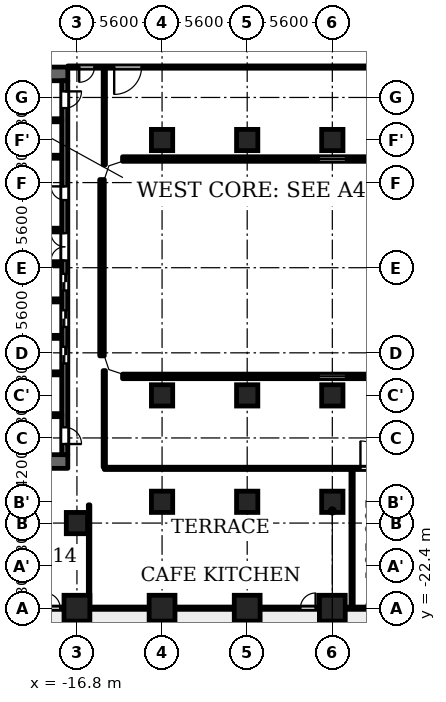
"""IFC4 building model, lengths in metres.
Left out: names, types, materials, properties, quantities, classifications, styles, units other than length and angle.
Written with IfcOpenShell. Run it as: python <this file> out.ifc"""

import sys

from ifc_helpers import new_model, si_unit, direction, frame, frame_2d, origin, origin_2d, place, context, subcontext, project, spatial, polyline, rectangle, outline, extrude, element, fill, save


model = new_model("IFC4")
c1 = context("Model", 3, precision=1e-05, world=origin(), true_north=direction((0.0, 1.0)))
c2 = subcontext(c1, "Body", "Model", "MODEL_VIEW")
j1 = project(units=[si_unit("LENGTHUNIT", "METRE"), si_unit("PLANEANGLEUNIT", "RADIAN")], contexts=[c1])
p1 = place(None, origin())
s1 = spatial("IfcSite", under=j1, at=p1, CompositionType="ELEMENT")
p2 = place(p1, origin())
s2 = spatial("IfcBuilding", under=s1, at=p2, CompositionType="ELEMENT")
p3 = place(p2, frame((0.0, 0.0, 25.7)))
s3 = spatial("IfcBuildingStorey", under=s2, at=p3, CompositionType="ELEMENT", Elevation=25.7)
for number, where, z_axis, x_axis in (
    (1, (-16.8, -22.4, 0.0), (0.0, 0.0, 1.0), (1.0, 0.0, 0.0)),
    (2, (-11.2, -22.4, 0.0), (0.0, 0.0, 1.0), (1.0, 0.0, 0.0)),
    (3, (-5.6, -22.4, 0.0), (0.0, 0.0, 1.0), (1.0, 0.0, 0.0)),
    (4, (0.0, -22.4, 0.0), (0.0, 0.0, 1.0), (1.0, 0.0, 0.0)),
):
    element("IfcColumn", number, at=place(p3, frame(where, z_axis=z_axis, x_axis=x_axis)), inside=s3, PredefinedType="COLUMN", context=c2, shape_type="SweptSolid", body=[
        extrude(rectangle(XDim=1.7, YDim=1.7, at=origin_2d()), origin(), (0.0, 0.0, 1.0), 4.8),
    ])
for number, where, z_axis, x_axis in (
    (5, (-16.8, -16.8, 0.0), (0.0, 0.0, 1.0), (1.0, 0.0, 0.0)),
    (6, (-11.2, -8.4, 0.0), (0.0, 0.0, 1.0), (1.0, 0.0, 0.0)),
    (7, (-11.2, 8.4, 0.0), (0.0, 0.0, 1.0), (1.0, 0.0, 0.0)),
    (8, (-5.6, -8.4, 0.0), (0.0, 0.0, 1.0), (1.0, 0.0, 0.0)),
    (9, (-5.6, 8.4, 0.0), (0.0, 0.0, 1.0), (1.0, 0.0, 0.0)),
    (10, (0.0, -8.4, 0.0), (0.0, 0.0, 1.0), (1.0, 0.0, 0.0)),
    (11, (0.0, 8.4, 0.0), (0.0, 0.0, 1.0), (1.0, 0.0, 0.0)),
    (12, (-11.2, -15.4, 0.0), (0.0, 0.0, 1.0), (1.0, 0.0, 0.0)),
    (13, (-5.6, -15.4, 0.0), (0.0, 0.0, 1.0), (1.0, 0.0, 0.0)),
    (14, (0.0, -15.4, 0.0), (0.0, 0.0, 1.0), (1.0, 0.0, 0.0)),
):
    element("IfcColumn", number, at=place(p3, frame(where, z_axis=z_axis, x_axis=x_axis)), inside=s3, PredefinedType="COLUMN", context=c2, shape_type="SweptSolid", body=[
        extrude(rectangle(XDim=1.4, YDim=1.4, at=origin_2d()), origin(), (0.0, 0.0, 1.0), 4.8),
    ])
p4 = place(p3, frame((-15.15, -5.8, 0.0), z_axis=(0.0, 0.0, 1.0), x_axis=(0.0, 1.0, 0.0)))
e15 = element("IfcWall", 15, at=p4, inside=s3, PredefinedType="SOLIDWALL", context=c2, shape_type="SweptSolid", body=[
    extrude(rectangle(XDim=11.6, YDim=0.3, at=frame_2d((5.8, 0.0))), origin(), (0.0, 0.0, 1.0), 4.45),
])
p5 = place(p3, frame((-13.8, 7.15, 0.0), z_axis=(0.0, 0.0, 1.0), x_axis=(1.0, 0.0, 0.0)))
e16 = element("IfcWall", 16, at=p5, inside=s3, PredefinedType="SOLIDWALL", context=c2, shape_type="SweptSolid", body=[
    extrude(rectangle(XDim=27.6, YDim=0.3, at=frame_2d((13.8, 0.0))), origin(), (0.0, 0.0, 1.0), 4.45),
])
p6 = place(p5, frame((12.9, 0.0, 0.9)))
e17 = element("IfcOpeningElement", 17, at=p6, cuts=e16, PredefinedType="OPENING", context=c2, shape_type="SweptSolid", body=[
    extrude(rectangle(XDim=1.8, YDim=1.25, at=frame_2d((0.9, 0.625))), frame((0.0, 0.16, 0.0), z_axis=(0.0, -1.0, 0.0), x_axis=(1.0, 0.0, 0.0)), (0.0, 0.0, 1.0), 0.32),
])
p7 = place(p3, frame((13.8, -7.15, 0.0), z_axis=(0.0, 0.0, 1.0), x_axis=(-1.0, 0.0, 0.0)))
e18 = element("IfcWall", 18, at=p7, inside=s3, PredefinedType="SOLIDWALL", context=c2, shape_type="SweptSolid", body=[
    extrude(rectangle(XDim=27.6, YDim=0.3, at=frame_2d((13.8, 0.0))), origin(), (0.0, 0.0, 1.0), 4.45),
])
p8 = place(p7, frame((12.9, 0.0, 0.9)))
e19 = element("IfcOpeningElement", 19, at=p8, cuts=e18, PredefinedType="OPENING", context=c2, shape_type="SweptSolid", body=[
    extrude(rectangle(XDim=1.8, YDim=1.25, at=frame_2d((0.9, 0.625))), frame((0.0, 0.16, 0.0), z_axis=(0.0, -1.0, 0.0), x_axis=(1.0, 0.0, 0.0)), (0.0, 0.0, 1.0), 0.32),
])
for number, where, z_axis, x_axis in (
    (20, (-17.4, 12.75, 0.0), (0.0, 0.0, 1.0), (-1.0, 0.0, 0.0)),
    (21, (-17.4, -12.75, 0.0), (0.0, 0.0, 1.0), (-1.0, 0.0, 0.0)),
):
    element("IfcWall", number, at=place(p3, frame(where, z_axis=z_axis, x_axis=x_axis)), inside=s3, PredefinedType="SHEAR", context=c2, shape_type="SweptSolid", body=[
        extrude(rectangle(XDim=10.4, YDim=0.9, at=frame_2d((5.2, 0.0))), origin(), (0.0, 0.0, 1.0), 4.45),
    ])
p9 = place(p3, frame((-17.6, -12.3, 0.0), z_axis=(0.0, 0.0, 1.0), x_axis=(0.0, 1.0, 0.0)))
e22 = element("IfcWall", 22, at=p9, inside=s3, PredefinedType="SHEAR", context=c2, shape_type="SweptSolid", body=[
    extrude(rectangle(XDim=24.6, YDim=0.4, at=frame_2d((12.3, 0.0))), origin(), (0.0, 0.0, 1.0), 4.45),
])
p10 = place(p9, frame((6.0, 0.0, 0.0)))
e23 = element("IfcOpeningElement", 23, at=p10, cuts=e22, PredefinedType="OPENING", context=c2, shape_type="SweptSolid", body=[
    extrude(rectangle(XDim=1.1, YDim=2.1, at=frame_2d((0.55, 1.05))), frame((0.0, 0.21, 0.0), z_axis=(0.0, -1.0, 0.0), x_axis=(1.0, 0.0, 0.0)), (0.0, 0.0, 1.0), 0.42),
])
p11 = place(p9, frame((8.4, 0.0, 0.0)))
e24 = element("IfcOpeningElement", 24, at=p11, cuts=e22, PredefinedType="OPENING", context=c2, shape_type="SweptSolid", body=[
    extrude(rectangle(XDim=1.1, YDim=2.1, at=frame_2d((0.55, 1.05))), frame((0.0, 0.21, 0.0), z_axis=(0.0, -1.0, 0.0), x_axis=(1.0, 0.0, 0.0)), (0.0, 0.0, 1.0), 0.42),
])
p12 = place(p9, frame((10.8, 0.0, 0.0)))
e25 = element("IfcOpeningElement", 25, at=p12, cuts=e22, PredefinedType="OPENING", context=c2, shape_type="SweptSolid", body=[
    extrude(rectangle(XDim=1.1, YDim=2.1, at=frame_2d((0.55, 1.05))), frame((0.0, 0.21, 0.0), z_axis=(0.0, -1.0, 0.0), x_axis=(1.0, 0.0, 0.0)), (0.0, 0.0, 1.0), 0.42),
])
p13 = place(p9, frame((16.75, 0.0, 0.0)))
e26 = element("IfcOpeningElement", 26, at=p13, cuts=e22, PredefinedType="OPENING", context=c2, shape_type="SweptSolid", body=[
    extrude(rectangle(XDim=0.9, YDim=2.1, at=frame_2d((0.45, 1.05))), frame((0.0, 0.21, 0.0), z_axis=(0.0, -1.0, 0.0), x_axis=(1.0, 0.0, 0.0)), (0.0, 0.0, 1.0), 0.42),
])
p14 = place(p9, frame((22.8, 0.0, 0.0)))
e27 = element("IfcOpeningElement", 27, at=p14, cuts=e22, PredefinedType="OPENING", context=c2, shape_type="SweptSolid", body=[
    extrude(rectangle(XDim=1.1, YDim=2.1, at=frame_2d((0.55, 1.05))), frame((0.0, 0.21, 0.0), z_axis=(0.0, -1.0, 0.0), x_axis=(1.0, 0.0, 0.0)), (0.0, 0.0, 1.0), 0.42),
])
p15 = place(p9, frame((0.7, 0.0, 0.0)))
e28 = element("IfcOpeningElement", 28, at=p15, cuts=e22, PredefinedType="OPENING", context=c2, shape_type="SweptSolid", body=[
    extrude(rectangle(XDim=1.1, YDim=2.1, at=frame_2d((0.55, 1.05))), frame((0.0, 0.21, 0.0), z_axis=(0.0, -1.0, 0.0), x_axis=(1.0, 0.0, 0.0)), (0.0, 0.0, 1.0), 0.42),
])
p16 = place(p9, frame((12.775, 0.0, 0.0)))
e29 = element("IfcOpeningElement", 29, at=p16, cuts=e22, PredefinedType="OPENING", context=c2, shape_type="SweptSolid", body=[
    extrude(rectangle(XDim=1.8, YDim=2.1, at=frame_2d((0.9, 1.05))), frame((0.0, 0.21, 0.0), z_axis=(0.0, -1.0, 0.0), x_axis=(1.0, 0.0, 0.0)), (0.0, 0.0, 1.0), 0.42),
])
p17 = place(p3, frame((-17.8, -9.7, 0.0), z_axis=(0.0, 0.0, 1.0), x_axis=(-1.0, 0.0, 0.0)))
e30 = element("IfcWall", 30, at=p17, inside=s3, PredefinedType="SHEAR", context=c2, shape_type="SweptSolid", body=[
    extrude(rectangle(XDim=8.3, YDim=0.2, at=frame_2d((4.15, 0.0))), origin(), (0.0, 0.0, 1.0), 4.45),
])
p18 = place(p17, frame((0.85, 0.0, 0.0)))
e31 = element("IfcOpeningElement", 31, at=p18, cuts=e30, PredefinedType="OPENING", context=c2, shape_type="SweptSolid", body=[
    extrude(rectangle(XDim=1.1, YDim=2.1, at=frame_2d((0.55, 1.05))), frame((0.0, 0.11, 0.0), z_axis=(0.0, -1.0, 0.0), x_axis=(1.0, 0.0, 0.0)), (0.0, 0.0, 1.0), 0.22),
])
p19 = place(p17, frame((3.75, 0.0, 0.0)))
e32 = element("IfcOpeningElement", 32, at=p19, cuts=e30, PredefinedType="OPENING", context=c2, shape_type="SweptSolid", body=[
    extrude(rectangle(XDim=1.1, YDim=2.1, at=frame_2d((0.55, 1.05))), frame((0.0, 0.11, 0.0), z_axis=(0.0, -1.0, 0.0), x_axis=(1.0, 0.0, 0.0)), (0.0, 0.0, 1.0), 0.22),
])
for number, where, z_axis, x_axis in (
    (33, (-17.8, -6.95, 0.0), (0.0, 0.0, 1.0), (-1.0, 0.0, 0.0)),
    (34, (-17.8, -4.55, 0.0), (0.0, 0.0, 1.0), (-1.0, 0.0, 0.0)),
    (35, (-17.8, -2.15, 0.0), (0.0, 0.0, 1.0), (-1.0, 0.0, 0.0)),
):
    element("IfcWall", number, at=place(p3, frame(where, z_axis=z_axis, x_axis=x_axis)), inside=s3, PredefinedType="PARTITIONING", context=c2, shape_type="SweptSolid", body=[
        extrude(rectangle(XDim=2.8, YDim=0.2, at=frame_2d((1.4, 0.0))), origin(), (0.0, 0.0, 1.0), 4.45),
    ])
for number, where, z_axis, x_axis in (
    (36, (-17.8, 0.25, 0.0), (0.0, 0.0, 1.0), (-1.0, 0.0, 0.0)),
    (37, (-17.8, 2.5, 0.0), (0.0, 0.0, 1.0), (-1.0, 0.0, 0.0)),
):
    element("IfcWall", number, at=place(p3, frame(where, z_axis=z_axis, x_axis=x_axis)), inside=s3, PredefinedType="PARTITIONING", context=c2, shape_type="SweptSolid", body=[
        extrude(rectangle(XDim=3.0, YDim=0.2, at=frame_2d((1.5, 0.0))), origin(), (0.0, 0.0, 1.0), 4.45),
    ])
p20 = place(p3, frame((-17.8, 7.3, 0.0), z_axis=(0.0, 0.0, 1.0), x_axis=(-1.0, 0.0, 0.0)))
e38 = element("IfcWall", 38, at=p20, inside=s3, PredefinedType="PARTITIONING", context=c2, shape_type="SweptSolid", body=[
    extrude(rectangle(XDim=2.8, YDim=0.2, at=frame_2d((1.4, 0.0))), origin(), (0.0, 0.0, 1.0), 4.45),
])
p21 = place(p3, frame((-17.8, 9.7, 0.0), z_axis=(0.0, 0.0, 1.0), x_axis=(-1.0, 0.0, 0.0)))
e39 = element("IfcWall", 39, at=p21, inside=s3, PredefinedType="SHEAR", context=c2, shape_type="SweptSolid", body=[
    extrude(rectangle(XDim=8.3, YDim=0.2, at=frame_2d((4.15, 0.0))), origin(), (0.0, 0.0, 1.0), 4.45),
])
p22 = place(p21, frame((0.85, 0.0, 0.0)))
e40 = element("IfcOpeningElement", 40, at=p22, cuts=e39, PredefinedType="OPENING", context=c2, shape_type="SweptSolid", body=[
    extrude(rectangle(XDim=1.1, YDim=2.1, at=frame_2d((0.55, 1.05))), frame((0.0, 0.11, 0.0), z_axis=(0.0, -1.0, 0.0), x_axis=(1.0, 0.0, 0.0)), (0.0, 0.0, 1.0), 0.22),
])
p23 = place(p21, frame((3.75, 0.0, 0.0)))
e41 = element("IfcOpeningElement", 41, at=p23, cuts=e39, PredefinedType="OPENING", context=c2, shape_type="SweptSolid", body=[
    extrude(rectangle(XDim=1.1, YDim=2.1, at=frame_2d((0.55, 1.05))), frame((0.0, 0.11, 0.0), z_axis=(0.0, -1.0, 0.0), x_axis=(1.0, 0.0, 0.0)), (0.0, 0.0, 1.0), 0.22),
])
p24 = place(p3, frame((-18.98, -22.4, 0.0), z_axis=(0.0, 0.0, 1.0), x_axis=(1.0, 0.0, 0.0)))
e42 = element("IfcWall", 42, at=p24, inside=s3, PredefinedType="PARTITIONING", context=c2, shape_type="SweptSolid", body=[
    extrude(rectangle(XDim=38.211, YDim=0.15, at=frame_2d((19.105, 0.0))), origin(), (0.0, 0.0, 1.0), 3.55),
])
p25 = place(p24, frame((21.18, 0.0, 0.0)))
e43 = element("IfcOpeningElement", 43, at=p25, cuts=e42, PredefinedType="OPENING", context=c2, shape_type="SweptSolid", body=[
    extrude(rectangle(XDim=1.2, YDim=2.1, at=frame_2d((0.6, 1.05))), frame((0.0, 0.085, 0.0), z_axis=(0.0, -1.0, 0.0), x_axis=(1.0, 0.0, 0.0)), (0.0, 0.0, 1.0), 0.17),
])
p26 = place(p24, frame((0.08, 0.0, 0.0)))
e44 = element("IfcOpeningElement", 44, at=p26, cuts=e42, PredefinedType="OPENING", context=c2, shape_type="SweptSolid", body=[
    extrude(rectangle(XDim=1.0, YDim=2.1, at=frame_2d((0.5, 1.05))), frame((0.0, 0.085, 0.0), z_axis=(0.0, -1.0, 0.0), x_axis=(1.0, 0.0, 0.0)), (0.0, 0.0, 1.0), 0.17),
])
p27 = place(p24, frame((16.88, 0.0, 0.0)))
e45 = element("IfcOpeningElement", 45, at=p27, cuts=e42, PredefinedType="OPENING", context=c2, shape_type="SweptSolid", body=[
    extrude(rectangle(XDim=1.0, YDim=2.1, at=frame_2d((0.5, 1.05))), frame((0.0, 0.085, 0.0), z_axis=(0.0, -1.0, 0.0), x_axis=(1.0, 0.0, 0.0)), (0.0, 0.0, 1.0), 0.17),
])
p28 = place(p24, frame((25.68, 0.0, 0.0)))
e46 = element("IfcOpeningElement", 46, at=p28, cuts=e42, PredefinedType="OPENING", context=c2, shape_type="SweptSolid", body=[
    extrude(rectangle(XDim=0.9, YDim=2.1, at=frame_2d((0.45, 1.05))), frame((0.0, 0.085, 0.0), z_axis=(0.0, -1.0, 0.0), x_axis=(1.0, 0.0, 0.0)), (0.0, 0.0, 1.0), 0.17),
])
p29 = place(p24, frame((31.18, 0.0, 0.0)))
e47 = element("IfcOpeningElement", 47, at=p29, cuts=e42, PredefinedType="OPENING", context=c2, shape_type="SweptSolid", body=[
    extrude(rectangle(XDim=0.9, YDim=2.1, at=frame_2d((0.45, 1.05))), frame((0.0, 0.085, 0.0), z_axis=(0.0, -1.0, 0.0), x_axis=(1.0, 0.0, 0.0)), (0.0, 0.0, 1.0), 0.17),
])
p30 = place(p24, frame((33.13, 0.0, 0.0)))
e48 = element("IfcOpeningElement", 48, at=p30, cuts=e42, PredefinedType="OPENING", context=c2, shape_type="SweptSolid", body=[
    extrude(rectangle(XDim=0.9, YDim=2.1, at=frame_2d((0.45, 1.05))), frame((0.0, 0.085, 0.0), z_axis=(0.0, -1.0, 0.0), x_axis=(1.0, 0.0, 0.0)), (0.0, 0.0, 1.0), 0.17),
])
p31 = place(p24, frame((37.231, 0.0, 0.0)))
e49 = element("IfcOpeningElement", 49, at=p31, cuts=e42, PredefinedType="OPENING", context=c2, shape_type="SweptSolid", body=[
    extrude(rectangle(XDim=0.9, YDim=2.1, at=frame_2d((0.45, 1.05))), frame((0.0, 0.085, 0.0), z_axis=(0.0, -1.0, 0.0), x_axis=(1.0, 0.0, 0.0)), (0.0, 0.0, 1.0), 0.17),
])
p32 = place(p3, frame((-15.005, -13.2, 0.0), z_axis=(0.0, 0.0, 1.0), x_axis=(1.0, 0.0, 0.0)))
e50 = element("IfcWall", 50, at=p32, inside=s3, PredefinedType="PARTITIONING", context=c2, shape_type="SweptSolid", body=[
    extrude(rectangle(XDim=30.01, YDim=0.15, at=frame_2d((15.005, 0.0))), origin(), (0.0, 0.0, 1.0), 4.45),
])
p33 = place(p32, frame((16.855, 0.0, 0.0)))
e51 = element("IfcOpeningElement", 51, at=p33, cuts=e50, PredefinedType="OPENING", context=c2, shape_type="SweptSolid", body=[
    extrude(rectangle(XDim=1.8, YDim=2.1, at=frame_2d((0.9, 1.05))), frame((0.0, 0.085, 0.0), z_axis=(0.0, -1.0, 0.0), x_axis=(1.0, 0.0, 0.0)), (0.0, 0.0, 1.0), 0.17),
])
p34 = place(p3, frame((-17.4, 13.2, 0.0), z_axis=(0.0, 0.0, 1.0), x_axis=(1.0, 0.0, 0.0)))
e52 = element("IfcWall", 52, at=p34, inside=s3, PredefinedType="PARTITIONING", context=c2, shape_type="SweptSolid", body=[
    extrude(rectangle(XDim=34.8, YDim=0.15, at=frame_2d((17.4, 0.0))), origin(), (0.0, 0.0, 1.0), 4.45),
])
p35 = place(p34, frame((3.05, 0.0, 0.0)))
e53 = element("IfcOpeningElement", 53, at=p35, cuts=e52, PredefinedType="OPENING", context=c2, shape_type="SweptSolid", body=[
    extrude(rectangle(XDim=1.8, YDim=2.1, at=frame_2d((0.9, 1.05))), frame((0.0, 0.085, 0.0), z_axis=(0.0, -1.0, 0.0), x_axis=(1.0, 0.0, 0.0)), (0.0, 0.0, 1.0), 0.17),
])
p36 = place(p34, frame((0.75, 0.0, 0.0)))
e54 = element("IfcOpeningElement", 54, at=p36, cuts=e52, PredefinedType="OPENING", context=c2, shape_type="SweptSolid", body=[
    extrude(rectangle(XDim=1.0, YDim=2.1, at=frame_2d((0.5, 1.05))), frame((0.0, 0.085, 0.0), z_axis=(0.0, -1.0, 0.0), x_axis=(1.0, 0.0, 0.0)), (0.0, 0.0, 1.0), 0.17),
])
p37 = place(p34, frame((33.15, 0.0, 0.0)))
e55 = element("IfcOpeningElement", 55, at=p37, cuts=e52, PredefinedType="OPENING", context=c2, shape_type="SweptSolid", body=[
    extrude(rectangle(XDim=1.0, YDim=2.1, at=frame_2d((0.5, 1.05))), frame((0.0, 0.085, 0.0), z_axis=(0.0, -1.0, 0.0), x_axis=(1.0, 0.0, 0.0)), (0.0, 0.0, 1.0), 0.17),
])
p38 = place(p3, frame((-16.0, -22.325, 0.0), z_axis=(0.0, 0.0, 1.0), x_axis=(0.0, 1.0, 0.0)))
e56 = element("IfcWall", 56, at=p38, inside=s3, PredefinedType="PARTITIONING", context=c2, shape_type="SweptSolid", body=[
    extrude(rectangle(XDim=6.725, YDim=0.1, at=frame_2d((3.362, 0.0))), origin(), (0.0, 0.0, 1.0), 4.45),
])
for number, where, z_axis, x_axis in (
    (57, (-15.0, -13.125, 0.0), (0.0, 0.0, 1.0), (0.0, 1.0, 0.0)),
    (58, (-15.0, 6.769, 0.0), (0.0, 0.0, 1.0), (0.0, 1.0, 0.0)),
):
    element("IfcWall", number, at=place(p3, frame(where, z_axis=z_axis, x_axis=x_axis)), inside=s3, PredefinedType="PARTITIONING", context=c2, shape_type="SweptSolid", body=[
        extrude(rectangle(XDim=6.356, YDim=0.15, at=frame_2d((3.178, 0.0))), origin(), (0.0, 0.0, 1.0), 4.45),
    ])
p39 = place(p3, frame((1.3, -22.325, 0.0), z_axis=(0.0, 0.0, 1.0), x_axis=(0.0, 1.0, 0.0)))
e59 = element("IfcWall", 59, at=p39, inside=s3, PredefinedType="PARTITIONING", context=c2, shape_type="SweptSolid", body=[
    extrude(rectangle(XDim=9.05, YDim=0.15, at=frame_2d((4.525, 0.0))), origin(), (0.0, 0.0, 1.0), 4.45),
])
p40 = place(p3, origin())
e60 = element("IfcWall", 60, at=p40, inside=s3, PredefinedType="SOLIDWALL", context=c2, shape_type="SweptSolid", body=[
    extrude(outline(polyline([(-13.849, 7.3), (-14.937, 6.937), (-15.3, 5.849), (-15.3, 5.8), (-15.0, 5.8), (-14.7, 6.7), (-13.8, 7.0), (-13.8, 7.3), (-13.849, 7.3)])), origin(), (0.0, 0.0, 1.0), 4.45),
])
e61 = element("IfcWall", 61, at=p40, inside=s3, PredefinedType="SOLIDWALL", context=c2, shape_type="SweptSolid", body=[
    extrude(outline(polyline([(-14.937, -6.937), (-13.849, -7.3), (-13.8, -7.3), (-13.8, -7.0), (-14.7, -6.7), (-15.0, -5.8), (-15.3, -5.8), (-15.3, -5.849), (-14.937, -6.937)])), origin(), (0.0, 0.0, 1.0), 4.45),
])
p41 = place(p10, origin())
e62 = element("IfcDoor", 62, at=p41, inside=s3, OperationType="DOUBLE_DOOR_SLIDING", PredefinedType="DOOR", context=c2, shape_type="SweptSolid", body=[
    extrude(rectangle(XDim=1.1, YDim=2.1, at=frame_2d((0.55, 1.05))), frame((0.0, 0.025, 0.0), z_axis=(0.0, -1.0, 0.0), x_axis=(1.0, 0.0, 0.0)), (0.0, 0.0, 1.0), 0.05),
])
fill(e23, e62)
p42 = place(p11, origin())
e63 = element("IfcDoor", 63, at=p42, inside=s3, OperationType="DOUBLE_DOOR_SLIDING", PredefinedType="DOOR", context=c2, shape_type="SweptSolid", body=[
    extrude(rectangle(XDim=1.1, YDim=2.1, at=frame_2d((0.55, 1.05))), frame((0.0, 0.025, 0.0), z_axis=(0.0, -1.0, 0.0), x_axis=(1.0, 0.0, 0.0)), (0.0, 0.0, 1.0), 0.05),
])
fill(e24, e63)
p43 = place(p12, origin())
e64 = element("IfcDoor", 64, at=p43, inside=s3, OperationType="DOUBLE_DOOR_SLIDING", PredefinedType="DOOR", context=c2, shape_type="SweptSolid", body=[
    extrude(rectangle(XDim=1.1, YDim=2.1, at=frame_2d((0.55, 1.05))), frame((0.0, 0.025, 0.0), z_axis=(0.0, -1.0, 0.0), x_axis=(1.0, 0.0, 0.0)), (0.0, 0.0, 1.0), 0.05),
])
fill(e25, e64)
p44 = place(p13, origin())
e65 = element("IfcDoor", 65, at=p44, inside=s3, OperationType="SINGLE_SWING_LEFT", PredefinedType="DOOR", context=c2, shape_type="SweptSolid", body=[
    extrude(rectangle(XDim=0.9, YDim=2.1, at=frame_2d((0.45, 1.05))), frame((0.0, 0.025, 0.0), z_axis=(0.0, -1.0, 0.0), x_axis=(1.0, 0.0, 0.0)), (0.0, 0.0, 1.0), 0.05),
])
fill(e26, e65)
p45 = place(p14, origin())
e66 = element("IfcDoor", 66, at=p45, inside=s3, OperationType="SINGLE_SWING_RIGHT", PredefinedType="DOOR", context=c2, shape_type="SweptSolid", body=[
    extrude(rectangle(XDim=1.1, YDim=2.1, at=frame_2d((0.55, 1.05))), frame((0.0, 0.025, 0.0), z_axis=(0.0, -1.0, 0.0), x_axis=(1.0, 0.0, 0.0)), (0.0, 0.0, 1.0), 0.05),
])
fill(e27, e66)
p46 = place(p15, origin())
e67 = element("IfcDoor", 67, at=p46, inside=s3, OperationType="SINGLE_SWING_LEFT", PredefinedType="DOOR", context=c2, shape_type="SweptSolid", body=[
    extrude(rectangle(XDim=1.1, YDim=2.1, at=frame_2d((0.55, 1.05))), frame((0.0, 0.025, 0.0), z_axis=(0.0, -1.0, 0.0), x_axis=(1.0, 0.0, 0.0)), (0.0, 0.0, 1.0), 0.05),
])
fill(e28, e67)
p47 = place(p16, origin())
e68 = element("IfcDoor", 68, at=p47, inside=s3, OperationType="DOUBLE_DOOR_SINGLE_SWING", PredefinedType="DOOR", context=c2, shape_type="SweptSolid", body=[
    extrude(rectangle(XDim=1.8, YDim=2.1, at=frame_2d((0.9, 1.05))), frame((0.0, 0.025, 0.0), z_axis=(0.0, -1.0, 0.0), x_axis=(1.0, 0.0, 0.0)), (0.0, 0.0, 1.0), 0.05),
])
fill(e29, e68)
p48 = place(p35, origin())
e69 = element("IfcDoor", 69, at=p48, inside=s3, OperationType="SINGLE_SWING_LEFT", PredefinedType="DOOR", context=c2, shape_type="SweptSolid", body=[
    extrude(rectangle(XDim=1.8, YDim=2.1, at=frame_2d((0.9, 1.05))), frame((0.0, 0.025, 0.0), z_axis=(0.0, -1.0, 0.0), x_axis=(1.0, 0.0, 0.0)), (0.0, 0.0, 1.0), 0.05),
])
fill(e53, e69)
p49 = place(p36, origin())
e70 = element("IfcDoor", 70, at=p49, inside=s3, OperationType="SINGLE_SWING_LEFT", PredefinedType="DOOR", context=c2, shape_type="SweptSolid", body=[
    extrude(rectangle(XDim=1.0, YDim=2.1, at=frame_2d((0.5, 1.05))), frame((0.0, 0.025, 0.0), z_axis=(0.0, -1.0, 0.0), x_axis=(1.0, 0.0, 0.0)), (0.0, 0.0, 1.0), 0.05),
])
fill(e54, e70)
p50 = place(p33, origin())
e71 = element("IfcDoor", 71, at=p50, inside=s3, OperationType="SINGLE_SWING_RIGHT", PredefinedType="DOOR", context=c2, shape_type="SweptSolid", body=[
    extrude(rectangle(XDim=1.8, YDim=2.1, at=frame_2d((0.9, 1.05))), frame((0.0, 0.025, 0.0), z_axis=(0.0, -1.0, 0.0), x_axis=(1.0, 0.0, 0.0)), (0.0, 0.0, 1.0), 0.05),
])
fill(e51, e71)
p51 = place(p25, origin())
e72 = element("IfcDoor", 72, at=p51, inside=s3, OperationType="SINGLE_SWING_LEFT", PredefinedType="DOOR", context=c2, shape_type="SweptSolid", body=[
    extrude(rectangle(XDim=1.2, YDim=2.1, at=frame_2d((0.6, 1.05))), frame((0.0, 0.025, 0.0), z_axis=(0.0, -1.0, 0.0), x_axis=(1.0, 0.0, 0.0)), (0.0, 0.0, 1.0), 0.05),
])
fill(e43, e72)
p52 = place(p26, origin())
e73 = element("IfcDoor", 73, at=p52, inside=s3, OperationType="SINGLE_SWING_RIGHT", PredefinedType="DOOR", context=c2, shape_type="SweptSolid", body=[
    extrude(rectangle(XDim=1.0, YDim=2.1, at=frame_2d((0.5, 1.05))), frame((0.0, 0.025, 0.0), z_axis=(0.0, -1.0, 0.0), x_axis=(1.0, 0.0, 0.0)), (0.0, 0.0, 1.0), 0.05),
])
fill(e44, e73)
p53 = place(p27, origin())
e74 = element("IfcDoor", 74, at=p53, inside=s3, OperationType="SINGLE_SWING_LEFT", PredefinedType="DOOR", context=c2, shape_type="SweptSolid", body=[
    extrude(rectangle(XDim=1.0, YDim=2.1, at=frame_2d((0.5, 1.05))), frame((0.0, 0.025, 0.0), z_axis=(0.0, -1.0, 0.0), x_axis=(1.0, 0.0, 0.0)), (0.0, 0.0, 1.0), 0.05),
])
fill(e45, e74)
p54 = place(p6, origin())
e75 = element("IfcWindow", 75, at=p54, inside=s3, PartitioningType="SINGLE_PANEL", PredefinedType="WINDOW", context=c2, shape_type="SweptSolid", body=[
    extrude(rectangle(XDim=1.8, YDim=1.25, at=frame_2d((0.9, 0.625))), frame((0.0, 0.03, 0.0), z_axis=(0.0, -1.0, 0.0), x_axis=(1.0, 0.0, 0.0)), (0.0, 0.0, 1.0), 0.06),
])
fill(e17, e75)
p55 = place(p8, origin())
e76 = element("IfcWindow", 76, at=p55, inside=s3, PartitioningType="SINGLE_PANEL", PredefinedType="WINDOW", context=c2, shape_type="SweptSolid", body=[
    extrude(rectangle(XDim=1.8, YDim=1.25, at=frame_2d((0.9, 0.625))), frame((0.0, 0.03, 0.0), z_axis=(0.0, -1.0, 0.0), x_axis=(1.0, 0.0, 0.0)), (0.0, 0.0, 1.0), 0.06),
])
fill(e19, e76)
save(model, sys.argv[1])
